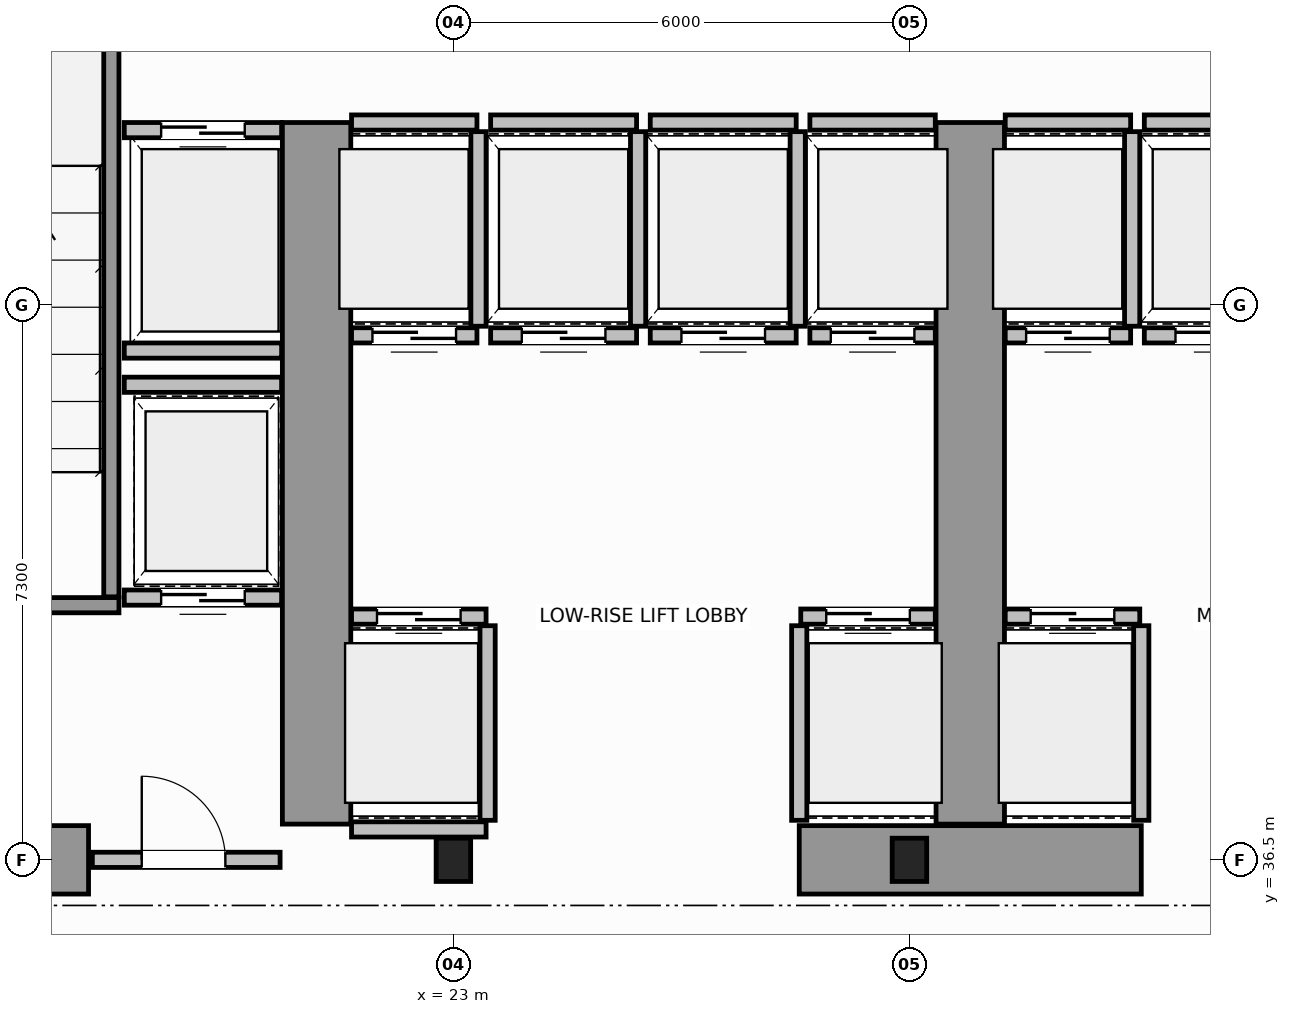
"""IFC4 building model, lengths in metres.
Left out: names, types, materials, properties, quantities, classifications, styles, units other than length and angle.
Written with IfcOpenShell. Run it as: python <this file> out.ifc"""

import sys

from ifc_helpers import new_model, si_unit, direction, frame, frame_2d, origin, origin_2d, place, context, subcontext, project, spatial, rectangle, i_section, extrude, source, transform, mapped, element, fill, save


model = new_model("IFC4")
c1 = context("Model", 3, precision=1e-05, world=origin(), true_north=direction((0.0, 1.0)))
c2 = subcontext(c1, "Body", "Model", "MODEL_VIEW")
j1 = project(units=[si_unit("LENGTHUNIT", "METRE"), si_unit("PLANEANGLEUNIT", "RADIAN")], contexts=[c1])
p1 = place(None, origin())
s1 = spatial("IfcSite", under=j1, at=p1, CompositionType="ELEMENT")
p2 = place(p1, origin())
s2 = spatial("IfcBuilding", under=s1, at=p2, CompositionType="ELEMENT")
p3 = place(p2, frame((0.0, 0.0, 10.0)))
s3 = spatial("IfcBuildingStorey", under=s2, at=p3, CompositionType="ELEMENT", Elevation=10.0)
m1 = source(origin(), c2, "Body", "SweptSolid", [
    extrude(i_section(OverallWidth=0.454, OverallDepth=0.569, WebThickness=0.078, FlangeThickness=0.08, FilletRadius=0.015, at=origin_2d()), origin(), (0.0, 0.0, 1.0), 4.4),
])
for number, where, z_axis, x_axis in (
    (1, (23.0, 36.5, 0.0), (0.0, 0.0, 1.0), (1.0, 0.0, 0.0)),
    (2, (29.0, 36.5, 0.0), (0.0, 0.0, 1.0), (1.0, 0.0, 0.0)),
):
    element("IfcColumn", number, at=place(p3, frame(where, z_axis=z_axis, x_axis=x_axis)), inside=s3, PredefinedType="COLUMN", context=c2, shape_type="MappedRepresentation", body=[
        mapped(m1, transform((0.0, 0.0, 0.0), scale=1.0)),
    ])
p4 = place(p3, frame((14.47, 36.5, 0.0), z_axis=(0.0, 0.0, 1.0), x_axis=(1.0, 0.0, 0.0)))
e3 = element("IfcWall", 3, at=p4, inside=s3, PredefinedType="SHEAR", context=c2, shape_type="SweptSolid", body=[
    extrude(rectangle(XDim=3.73, YDim=0.9, at=frame_2d((1.865, 0.0))), origin(), (0.0, 0.0, 1.0), 2.92),
])
p5 = place(p3, frame((27.55, 36.5, 0.0), z_axis=(0.0, 0.0, 1.0), x_axis=(1.0, 0.0, 0.0)))
e4 = element("IfcWall", 4, at=p5, inside=s3, PredefinedType="SHEAR", context=c2, shape_type="SweptSolid", body=[
    extrude(rectangle(XDim=4.5, YDim=0.9, at=frame_2d((2.25, 0.0))), origin(), (0.0, 0.0, 1.0), 4.4),
])
for number, where, z_axis, x_axis in (
    (5, (21.2, 36.97, 0.0), (0.0, 0.0, 1.0), (0.0, 1.0, 0.0)),
    (6, (29.8, 36.97, 0.0), (0.0, 0.0, 1.0), (0.0, 1.0, 0.0)),
):
    element("IfcWall", number, at=place(p3, frame(where, z_axis=z_axis, x_axis=x_axis)), inside=s3, PredefinedType="SHEAR", context=c2, shape_type="SweptSolid", body=[
        extrude(rectangle(XDim=9.23, YDim=0.9, at=frame_2d((4.615, 0.0))), origin(), (0.0, 0.0, 1.0), 4.4),
    ])
p6 = place(p3, frame((14.45, 39.85, 0.0), z_axis=(0.0, 0.0, 1.0), x_axis=(1.0, 0.0, 0.0)))
e7 = element("IfcWall", 7, at=p6, inside=s3, PredefinedType="SOLIDWALL", context=c2, shape_type="SweptSolid", body=[
    extrude(rectangle(XDim=4.15, YDim=0.2, at=frame_2d((2.075, 0.0))), origin(), (0.0, 0.0, 1.0), 4.4),
])
p7 = place(p6, frame((1.725, 0.0, 0.0)))
e8 = element("IfcOpeningElement", 8, at=p7, cuts=e7, PredefinedType="OPENING", context=c2, shape_type="SweptSolid", body=[
    extrude(rectangle(XDim=1.1, YDim=2.15, at=frame_2d((0.55, 1.075))), frame((0.0, 0.11, 0.0), z_axis=(0.0, -1.0, 0.0), x_axis=(1.0, 0.0, 0.0)), (0.0, 0.0, 1.0), 0.22),
])
p8 = place(p3, frame((18.5, 39.96, 0.0), z_axis=(0.0, 0.0, 1.0), x_axis=(0.0, 1.0, 0.0)))
e9 = element("IfcWall", 9, at=p8, inside=s3, PredefinedType="SOLIDWALL", context=c2, shape_type="SweptSolid", body=[
    extrude(rectangle(XDim=9.93, YDim=0.2, at=frame_2d((4.965, 0.0))), origin(), (0.0, 0.0, 1.0), 4.4),
])
p9 = place(p3, frame((18.25, 36.5, 0.0), z_axis=(0.0, 0.0, 1.0), x_axis=(1.0, 0.0, 0.0)))
e10 = element("IfcWall", 10, at=p9, inside=s3, PredefinedType="SOLIDWALL", context=c2, shape_type="SweptSolid", body=[
    extrude(rectangle(XDim=2.47, YDim=0.2, at=frame_2d((1.235, 0.0))), origin(), (0.0, 0.0, 1.0), 2.91),
])
p10 = place(p9, frame((0.65, 0.0, 0.0)))
e11 = element("IfcOpeningElement", 11, at=p10, cuts=e10, PredefinedType="OPENING", context=c2, shape_type="SweptSolid", body=[
    extrude(rectangle(XDim=1.1, YDim=2.15, at=frame_2d((0.55, 1.075))), frame((0.0, 0.11, 0.0), z_axis=(0.0, -1.0, 0.0), x_axis=(1.0, 0.0, 0.0)), (0.0, 0.0, 1.0), 0.22),
])
p11 = place(p3, frame((21.66, 39.7, 0.0), z_axis=(0.0, 0.0, 1.0), x_axis=(1.0, 0.0, 0.0)))
e12 = element("IfcWall", 12, at=p11, inside=s3, PredefinedType="SOLIDWALL", context=c2, shape_type="SweptSolid", body=[
    extrude(rectangle(XDim=1.77, YDim=0.2, at=frame_2d((0.885, 0.0))), origin(), (0.0, 0.0, 1.0), 4.12),
])
p12 = place(p11, frame((0.335, 0.0, 0.0)))
e13 = element("IfcOpeningElement", 13, at=p12, cuts=e12, PredefinedType="OPENING", context=c2, shape_type="SweptSolid", body=[
    extrude(rectangle(XDim=1.1, YDim=2.15, at=frame_2d((0.55, 1.075))), frame((0.0, 0.11, 0.0), z_axis=(0.0, -1.0, 0.0), x_axis=(1.0, 0.0, 0.0)), (0.0, 0.0, 1.0), 0.22),
])
p13 = place(p3, frame((21.66, 36.9, 0.0), z_axis=(0.0, 0.0, 1.0), x_axis=(1.0, 0.0, 0.0)))
e14 = element("IfcWall", 14, at=p13, inside=s3, PredefinedType="SOLIDWALL", context=c2, shape_type="SweptSolid", body=[
    extrude(rectangle(XDim=1.77, YDim=0.2, at=frame_2d((0.885, 0.0))), origin(), (0.0, 0.0, 1.0), 2.91),
])
p14 = place(p3, frame((23.45, 37.02, 0.0), z_axis=(0.0, 0.0, 1.0), x_axis=(0.0, 1.0, 0.0)))
e15 = element("IfcWall", 15, at=p14, inside=s3, PredefinedType="SOLIDWALL", context=c2, shape_type="SweptSolid", body=[
    extrude(rectangle(XDim=2.56, YDim=0.2, at=frame_2d((1.28, 0.0))), origin(), (0.0, 0.0, 1.0), 4.12),
])
p15 = place(p3, frame((27.57, 39.7, 0.0), z_axis=(0.0, 0.0, 1.0), x_axis=(1.0, 0.0, 0.0)))
e16 = element("IfcWall", 16, at=p15, inside=s3, PredefinedType="SOLIDWALL", context=c2, shape_type="SweptSolid", body=[
    extrude(rectangle(XDim=1.77, YDim=0.2, at=frame_2d((0.885, 0.0))), origin(), (0.0, 0.0, 1.0), 4.12),
])
p16 = place(p15, frame((0.335, 0.0, 0.0)))
e17 = element("IfcOpeningElement", 17, at=p16, cuts=e16, PredefinedType="OPENING", context=c2, shape_type="SweptSolid", body=[
    extrude(rectangle(XDim=1.1, YDim=2.15, at=frame_2d((0.55, 1.075))), frame((0.0, 0.11, 0.0), z_axis=(0.0, -1.0, 0.0), x_axis=(1.0, 0.0, 0.0)), (0.0, 0.0, 1.0), 0.22),
])
p17 = place(p3, frame((27.55, 37.02, 0.0), z_axis=(0.0, 0.0, 1.0), x_axis=(0.0, 1.0, 0.0)))
e18 = element("IfcWall", 18, at=p17, inside=s3, PredefinedType="SOLIDWALL", context=c2, shape_type="SweptSolid", body=[
    extrude(rectangle(XDim=2.56, YDim=0.2, at=frame_2d((1.28, 0.0))), origin(), (0.0, 0.0, 1.0), 4.12),
])
p18 = place(p3, frame((21.66, 43.4, 0.0), z_axis=(0.0, 0.0, 1.0), x_axis=(1.0, 0.0, 0.0)))
e19 = element("IfcWall", 19, at=p18, inside=s3, PredefinedType="SOLIDWALL", context=c2, shape_type="SweptSolid", body=[
    extrude(rectangle(XDim=1.65, YDim=0.2, at=frame_2d((0.825, 0.0))), origin(), (0.0, 0.0, 1.0), 4.12),
])
p19 = place(p18, frame((0.275, 0.0, 0.0)))
e20 = element("IfcOpeningElement", 20, at=p19, cuts=e19, PredefinedType="OPENING", context=c2, shape_type="SweptSolid", body=[
    extrude(rectangle(XDim=1.1, YDim=2.15, at=frame_2d((0.55, 1.075))), frame((0.0, 0.11, 0.0), z_axis=(0.0, -1.0, 0.0), x_axis=(1.0, 0.0, 0.0)), (0.0, 0.0, 1.0), 0.22),
])
p20 = place(p3, frame((21.66, 46.2, 0.0), z_axis=(0.0, 0.0, 1.0), x_axis=(1.0, 0.0, 0.0)))
e21 = element("IfcWall", 21, at=p20, inside=s3, PredefinedType="SOLIDWALL", context=c2, shape_type="SweptSolid", body=[
    extrude(rectangle(XDim=1.65, YDim=0.2, at=frame_2d((0.825, 0.0))), origin(), (0.0, 0.0, 1.0), 4.12),
])
p21 = place(p3, frame((23.33, 43.52, 0.0), z_axis=(0.0, 0.0, 1.0), x_axis=(0.0, 1.0, 0.0)))
e22 = element("IfcWall", 22, at=p21, inside=s3, PredefinedType="SOLIDWALL", context=c2, shape_type="SweptSolid", body=[
    extrude(rectangle(XDim=2.56, YDim=0.2, at=frame_2d((1.28, 0.0))), origin(), (0.0, 0.0, 1.0), 4.12),
])
p22 = place(p3, frame((23.49, 43.4, 0.0), z_axis=(0.0, 0.0, 1.0), x_axis=(1.0, 0.0, 0.0)))
e23 = element("IfcWall", 23, at=p22, inside=s3, PredefinedType="SOLIDWALL", context=c2, shape_type="SweptSolid", body=[
    extrude(rectangle(XDim=1.92, YDim=0.2, at=frame_2d((0.96, 0.0))), origin(), (0.0, 0.0, 1.0), 4.12),
])
p23 = place(p22, frame((0.41, 0.0, 0.0)))
e24 = element("IfcOpeningElement", 24, at=p23, cuts=e23, PredefinedType="OPENING", context=c2, shape_type="SweptSolid", body=[
    extrude(rectangle(XDim=1.1, YDim=2.15, at=frame_2d((0.55, 1.075))), frame((0.0, 0.11, 0.0), z_axis=(0.0, -1.0, 0.0), x_axis=(1.0, 0.0, 0.0)), (0.0, 0.0, 1.0), 0.22),
])
p24 = place(p3, frame((23.49, 46.2, 0.0), z_axis=(0.0, 0.0, 1.0), x_axis=(1.0, 0.0, 0.0)))
e25 = element("IfcWall", 25, at=p24, inside=s3, PredefinedType="SOLIDWALL", context=c2, shape_type="SweptSolid", body=[
    extrude(rectangle(XDim=1.92, YDim=0.2, at=frame_2d((0.96, 0.0))), origin(), (0.0, 0.0, 1.0), 4.12),
])
p25 = place(p3, frame((25.43, 43.52, 0.0), z_axis=(0.0, 0.0, 1.0), x_axis=(0.0, 1.0, 0.0)))
e26 = element("IfcWall", 26, at=p25, inside=s3, PredefinedType="SOLIDWALL", context=c2, shape_type="SweptSolid", body=[
    extrude(rectangle(XDim=2.56, YDim=0.2, at=frame_2d((1.28, 0.0))), origin(), (0.0, 0.0, 1.0), 4.12),
])
p26 = place(p3, frame((25.59, 43.4, 0.0), z_axis=(0.0, 0.0, 1.0), x_axis=(1.0, 0.0, 0.0)))
e27 = element("IfcWall", 27, at=p26, inside=s3, PredefinedType="SOLIDWALL", context=c2, shape_type="SweptSolid", body=[
    extrude(rectangle(XDim=1.92, YDim=0.2, at=frame_2d((0.96, 0.0))), origin(), (0.0, 0.0, 1.0), 4.12),
])
p27 = place(p26, frame((0.41, 0.0, 0.0)))
e28 = element("IfcOpeningElement", 28, at=p27, cuts=e27, PredefinedType="OPENING", context=c2, shape_type="SweptSolid", body=[
    extrude(rectangle(XDim=1.1, YDim=2.15, at=frame_2d((0.55, 1.075))), frame((0.0, 0.11, 0.0), z_axis=(0.0, -1.0, 0.0), x_axis=(1.0, 0.0, 0.0)), (0.0, 0.0, 1.0), 0.22),
])
p28 = place(p3, frame((25.59, 46.2, 0.0), z_axis=(0.0, 0.0, 1.0), x_axis=(1.0, 0.0, 0.0)))
e29 = element("IfcWall", 29, at=p28, inside=s3, PredefinedType="SOLIDWALL", context=c2, shape_type="SweptSolid", body=[
    extrude(rectangle(XDim=1.92, YDim=0.2, at=frame_2d((0.96, 0.0))), origin(), (0.0, 0.0, 1.0), 4.12),
])
p29 = place(p3, frame((27.53, 43.52, 0.0), z_axis=(0.0, 0.0, 1.0), x_axis=(0.0, 1.0, 0.0)))
e30 = element("IfcWall", 30, at=p29, inside=s3, PredefinedType="SOLIDWALL", context=c2, shape_type="SweptSolid", body=[
    extrude(rectangle(XDim=2.56, YDim=0.2, at=frame_2d((1.28, 0.0))), origin(), (0.0, 0.0, 1.0), 4.12),
])
p30 = place(p3, frame((27.69, 43.4, 0.0), z_axis=(0.0, 0.0, 1.0), x_axis=(1.0, 0.0, 0.0)))
e31 = element("IfcWall", 31, at=p30, inside=s3, PredefinedType="SOLIDWALL", context=c2, shape_type="SweptSolid", body=[
    extrude(rectangle(XDim=1.65, YDim=0.2, at=frame_2d((0.825, 0.0))), origin(), (0.0, 0.0, 1.0), 4.12),
])
p31 = place(p30, frame((0.275, 0.0, 0.0)))
e32 = element("IfcOpeningElement", 32, at=p31, cuts=e31, PredefinedType="OPENING", context=c2, shape_type="SweptSolid", body=[
    extrude(rectangle(XDim=1.1, YDim=2.15, at=frame_2d((0.55, 1.075))), frame((0.0, 0.11, 0.0), z_axis=(0.0, -1.0, 0.0), x_axis=(1.0, 0.0, 0.0)), (0.0, 0.0, 1.0), 0.22),
])
p32 = place(p3, frame((27.69, 46.2, 0.0), z_axis=(0.0, 0.0, 1.0), x_axis=(1.0, 0.0, 0.0)))
e33 = element("IfcWall", 33, at=p32, inside=s3, PredefinedType="SOLIDWALL", context=c2, shape_type="SweptSolid", body=[
    extrude(rectangle(XDim=1.65, YDim=0.2, at=frame_2d((0.825, 0.0))), origin(), (0.0, 0.0, 1.0), 4.12),
])
p33 = place(p3, frame((30.26, 39.7, 0.0), z_axis=(0.0, 0.0, 1.0), x_axis=(1.0, 0.0, 0.0)))
e34 = element("IfcWall", 34, at=p33, inside=s3, PredefinedType="SOLIDWALL", context=c2, shape_type="SweptSolid", body=[
    extrude(rectangle(XDim=1.77, YDim=0.2, at=frame_2d((0.885, 0.0))), origin(), (0.0, 0.0, 1.0), 4.12),
])
p34 = place(p33, frame((0.335, 0.0, 0.0)))
e35 = element("IfcOpeningElement", 35, at=p34, cuts=e34, PredefinedType="OPENING", context=c2, shape_type="SweptSolid", body=[
    extrude(rectangle(XDim=1.1, YDim=2.15, at=frame_2d((0.55, 1.075))), frame((0.0, 0.11, 0.0), z_axis=(0.0, -1.0, 0.0), x_axis=(1.0, 0.0, 0.0)), (0.0, 0.0, 1.0), 0.22),
])
p35 = place(p3, frame((32.05, 37.02, 0.0), z_axis=(0.0, 0.0, 1.0), x_axis=(0.0, 1.0, 0.0)))
e36 = element("IfcWall", 36, at=p35, inside=s3, PredefinedType="SOLIDWALL", context=c2, shape_type="SweptSolid", body=[
    extrude(rectangle(XDim=2.56, YDim=0.2, at=frame_2d((1.28, 0.0))), origin(), (0.0, 0.0, 1.0), 4.12),
])
p36 = place(p3, frame((30.26, 43.4, 0.0), z_axis=(0.0, 0.0, 1.0), x_axis=(1.0, 0.0, 0.0)))
e37 = element("IfcWall", 37, at=p36, inside=s3, PredefinedType="SOLIDWALL", context=c2, shape_type="SweptSolid", body=[
    extrude(rectangle(XDim=1.65, YDim=0.2, at=frame_2d((0.825, 0.0))), origin(), (0.0, 0.0, 1.0), 4.12),
])
p37 = place(p36, frame((0.275, 0.0, 0.0)))
e38 = element("IfcOpeningElement", 38, at=p37, cuts=e37, PredefinedType="OPENING", context=c2, shape_type="SweptSolid", body=[
    extrude(rectangle(XDim=1.1, YDim=2.15, at=frame_2d((0.55, 1.075))), frame((0.0, 0.11, 0.0), z_axis=(0.0, -1.0, 0.0), x_axis=(1.0, 0.0, 0.0)), (0.0, 0.0, 1.0), 0.22),
])
p38 = place(p3, frame((30.26, 46.2, 0.0), z_axis=(0.0, 0.0, 1.0), x_axis=(1.0, 0.0, 0.0)))
e39 = element("IfcWall", 39, at=p38, inside=s3, PredefinedType="SOLIDWALL", context=c2, shape_type="SweptSolid", body=[
    extrude(rectangle(XDim=1.65, YDim=0.2, at=frame_2d((0.825, 0.0))), origin(), (0.0, 0.0, 1.0), 4.12),
])
p39 = place(p3, frame((31.93, 43.52, 0.0), z_axis=(0.0, 0.0, 1.0), x_axis=(0.0, 1.0, 0.0)))
e40 = element("IfcWall", 40, at=p39, inside=s3, PredefinedType="SOLIDWALL", context=c2, shape_type="SweptSolid", body=[
    extrude(rectangle(XDim=2.56, YDim=0.2, at=frame_2d((1.28, 0.0))), origin(), (0.0, 0.0, 1.0), 4.12),
])
p40 = place(p3, frame((32.09, 43.4, 0.0), z_axis=(0.0, 0.0, 1.0), x_axis=(1.0, 0.0, 0.0)))
e41 = element("IfcWall", 41, at=p40, inside=s3, PredefinedType="SOLIDWALL", context=c2, shape_type="SweptSolid", body=[
    extrude(rectangle(XDim=1.92, YDim=0.2, at=frame_2d((0.96, 0.0))), origin(), (0.0, 0.0, 1.0), 4.12),
])
p41 = place(p40, frame((0.41, 0.0, 0.0)))
e42 = element("IfcOpeningElement", 42, at=p41, cuts=e41, PredefinedType="OPENING", context=c2, shape_type="SweptSolid", body=[
    extrude(rectangle(XDim=1.1, YDim=2.15, at=frame_2d((0.55, 1.075))), frame((0.0, 0.11, 0.0), z_axis=(0.0, -1.0, 0.0), x_axis=(1.0, 0.0, 0.0)), (0.0, 0.0, 1.0), 0.22),
])
p42 = place(p3, frame((32.09, 46.2, 0.0), z_axis=(0.0, 0.0, 1.0), x_axis=(1.0, 0.0, 0.0)))
e43 = element("IfcWall", 43, at=p42, inside=s3, PredefinedType="SOLIDWALL", context=c2, shape_type="SweptSolid", body=[
    extrude(rectangle(XDim=1.92, YDim=0.2, at=frame_2d((0.96, 0.0))), origin(), (0.0, 0.0, 1.0), 4.12),
])
p43 = place(p3, frame((18.67, 46.1, 0.0), z_axis=(0.0, 0.0, 1.0), x_axis=(1.0, 0.0, 0.0)))
e44 = element("IfcWall", 44, at=p43, inside=s3, PredefinedType="SOLIDWALL", context=c2, shape_type="SweptSolid", body=[
    extrude(rectangle(XDim=2.07, YDim=0.2, at=frame_2d((1.035, 0.0))), origin(), (0.0, 0.0, 1.0), 4.12),
])
p44 = place(p43, frame((0.485, 0.0, 0.0)))
e45 = element("IfcOpeningElement", 45, at=p44, cuts=e44, PredefinedType="OPENING", context=c2, shape_type="SweptSolid", body=[
    extrude(rectangle(XDim=1.1, YDim=2.15, at=frame_2d((0.55, 1.075))), frame((0.0, 0.11, 0.0), z_axis=(0.0, -1.0, 0.0), x_axis=(1.0, 0.0, 0.0)), (0.0, 0.0, 1.0), 0.22),
])
p45 = place(p3, frame((18.67, 43.2, 0.0), z_axis=(0.0, 0.0, 1.0), x_axis=(1.0, 0.0, 0.0)))
e46 = element("IfcWall", 46, at=p45, inside=s3, PredefinedType="SOLIDWALL", context=c2, shape_type="SweptSolid", body=[
    extrude(rectangle(XDim=2.07, YDim=0.2, at=frame_2d((1.035, 0.0))), origin(), (0.0, 0.0, 1.0), 4.12),
])
p46 = place(p3, frame((18.67, 39.95, 0.0), z_axis=(0.0, 0.0, 1.0), x_axis=(1.0, 0.0, 0.0)))
e47 = element("IfcWall", 47, at=p46, inside=s3, PredefinedType="SOLIDWALL", context=c2, shape_type="SweptSolid", body=[
    extrude(rectangle(XDim=2.07, YDim=0.2, at=frame_2d((1.035, 0.0))), origin(), (0.0, 0.0, 1.0), 4.12),
])
p47 = place(p46, frame((0.485, 0.0, 0.0)))
e48 = element("IfcOpeningElement", 48, at=p47, cuts=e47, PredefinedType="OPENING", context=c2, shape_type="SweptSolid", body=[
    extrude(rectangle(XDim=1.1, YDim=2.15, at=frame_2d((0.55, 1.075))), frame((0.0, 0.11, 0.0), z_axis=(0.0, -1.0, 0.0), x_axis=(1.0, 0.0, 0.0)), (0.0, 0.0, 1.0), 0.22),
])
p48 = place(p3, frame((18.67, 42.75, 0.0), z_axis=(0.0, 0.0, 1.0), x_axis=(1.0, 0.0, 0.0)))
e49 = element("IfcWall", 49, at=p48, inside=s3, PredefinedType="SOLIDWALL", context=c2, shape_type="SweptSolid", body=[
    extrude(rectangle(XDim=2.07, YDim=0.2, at=frame_2d((1.035, 0.0))), origin(), (0.0, 0.0, 1.0), 4.12),
])
m2 = source(origin(), c2, "Body", "SweptSolid", [
    extrude(rectangle(XDim=1.1, YDim=2.15, at=frame_2d((0.55, 1.075))), frame((0.0, 0.025, 0.0), z_axis=(0.0, -1.0, 0.0), x_axis=(1.0, 0.0, 0.0)), (0.0, 0.0, 1.0), 0.05),
])
p49 = place(p10, origin())
e50 = element("IfcDoor", 50, at=p49, inside=s3, OperationType="SINGLE_SWING_RIGHT", PredefinedType="DOOR", context=c2, shape_type="MappedRepresentation", body=[
    mapped(m2, transform((0.0, 0.0, 0.0), scale=1.0)),
])
fill(e11, e50)
p50 = place(p12, origin())
e51 = element("IfcDoor", 51, at=p50, inside=s3, OperationType="DOUBLE_DOOR_SLIDING", PredefinedType="DOOR", context=c2, shape_type="MappedRepresentation", body=[
    mapped(m2, transform((0.0, 0.0, 0.0), scale=1.0)),
])
fill(e13, e51)
p51 = place(p16, origin())
e52 = element("IfcDoor", 52, at=p51, inside=s3, OperationType="DOUBLE_DOOR_SLIDING", PredefinedType="DOOR", context=c2, shape_type="MappedRepresentation", body=[
    mapped(m2, transform((0.0, 0.0, 0.0), scale=1.0)),
])
fill(e17, e52)
p52 = place(p19, origin())
e53 = element("IfcDoor", 53, at=p52, inside=s3, OperationType="DOUBLE_DOOR_SLIDING", PredefinedType="DOOR", context=c2, shape_type="MappedRepresentation", body=[
    mapped(m2, transform((0.0, 0.0, 0.0), scale=1.0)),
])
fill(e20, e53)
p53 = place(p23, origin())
e54 = element("IfcDoor", 54, at=p53, inside=s3, OperationType="DOUBLE_DOOR_SLIDING", PredefinedType="DOOR", context=c2, shape_type="MappedRepresentation", body=[
    mapped(m2, transform((0.0, 0.0, 0.0), scale=1.0)),
])
fill(e24, e54)
p54 = place(p27, origin())
e55 = element("IfcDoor", 55, at=p54, inside=s3, OperationType="DOUBLE_DOOR_SLIDING", PredefinedType="DOOR", context=c2, shape_type="MappedRepresentation", body=[
    mapped(m2, transform((0.0, 0.0, 0.0), scale=1.0)),
])
fill(e28, e55)
p55 = place(p31, origin())
e56 = element("IfcDoor", 56, at=p55, inside=s3, OperationType="DOUBLE_DOOR_SLIDING", PredefinedType="DOOR", context=c2, shape_type="MappedRepresentation", body=[
    mapped(m2, transform((0.0, 0.0, 0.0), scale=1.0)),
])
fill(e32, e56)
p56 = place(p34, origin())
e57 = element("IfcDoor", 57, at=p56, inside=s3, OperationType="DOUBLE_DOOR_SLIDING", PredefinedType="DOOR", context=c2, shape_type="MappedRepresentation", body=[
    mapped(m2, transform((0.0, 0.0, 0.0), scale=1.0)),
])
fill(e35, e57)
p57 = place(p37, origin())
e58 = element("IfcDoor", 58, at=p57, inside=s3, OperationType="DOUBLE_DOOR_SLIDING", PredefinedType="DOOR", context=c2, shape_type="MappedRepresentation", body=[
    mapped(m2, transform((0.0, 0.0, 0.0), scale=1.0)),
])
fill(e38, e58)
p58 = place(p41, origin())
e59 = element("IfcDoor", 59, at=p58, inside=s3, OperationType="DOUBLE_DOOR_SLIDING", PredefinedType="DOOR", context=c2, shape_type="MappedRepresentation", body=[
    mapped(m2, transform((0.0, 0.0, 0.0), scale=1.0)),
])
fill(e42, e59)
p59 = place(p44, origin())
e60 = element("IfcDoor", 60, at=p59, inside=s3, OperationType="DOUBLE_DOOR_SLIDING", PredefinedType="DOOR", context=c2, shape_type="MappedRepresentation", body=[
    mapped(m2, transform((0.0, 0.0, 0.0), scale=1.0)),
])
fill(e45, e60)
p60 = place(p47, origin())
e61 = element("IfcDoor", 61, at=p60, inside=s3, OperationType="DOUBLE_DOOR_SLIDING", PredefinedType="DOOR", context=c2, shape_type="MappedRepresentation", body=[
    mapped(m2, transform((0.0, 0.0, 0.0), scale=1.0)),
])
fill(e48, e61)
save(model, sys.argv[1])
